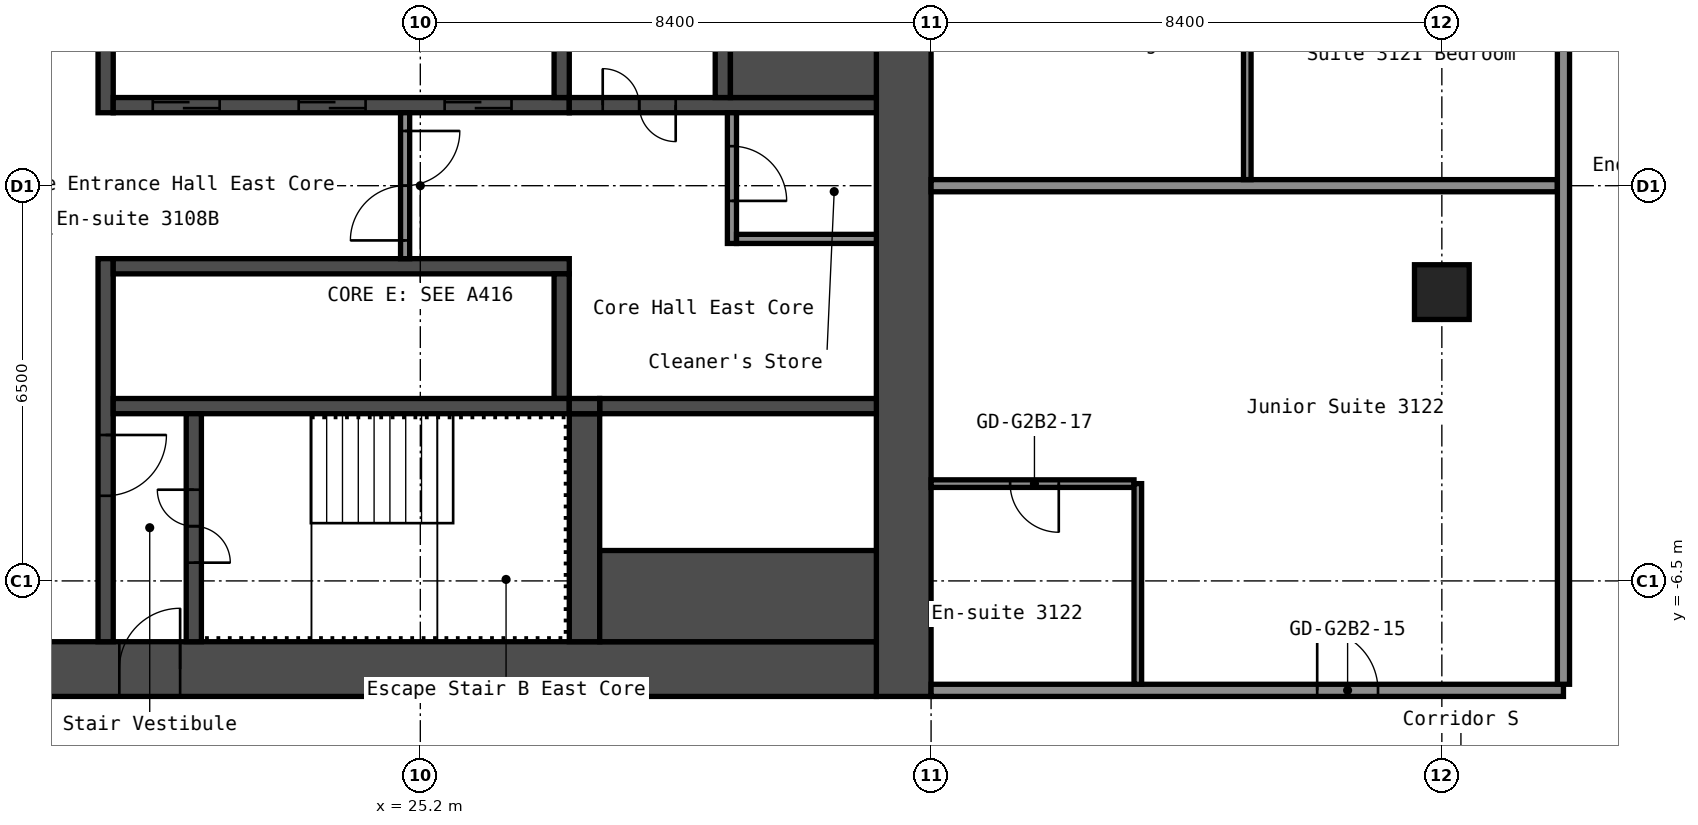
"""IFC4 building model, lengths in metres.
Left out: names, types, materials, properties, quantities, classifications, styles, units other than length and angle.
Written with IfcOpenShell. Run it as: python <this file> out.ifc"""

import sys

from ifc_helpers import new_model, si_unit, direction, frame, frame_2d, origin, origin_2d, place, context, subcontext, project, spatial, rectangle, hollow_rectangle, extrude, element, fill, save


model = new_model("IFC4")
c1 = context("Model", 3, precision=1e-05, world=origin(), true_north=direction((0.0, 1.0)))
c2 = subcontext(c1, "Body", "Model", "MODEL_VIEW")
j1 = project(units=[si_unit("LENGTHUNIT", "METRE"), si_unit("PLANEANGLEUNIT", "RADIAN")], contexts=[c1])
p1 = place(None, origin())
s1 = spatial("IfcSite", under=j1, at=p1, CompositionType="ELEMENT")
p2 = place(p1, origin())
s2 = spatial("IfcBuilding", under=s1, at=p2, CompositionType="ELEMENT")
p3 = place(p2, frame((0.0, 0.0, 110.6)))
s3 = spatial("IfcBuildingStorey", under=s2, at=p3, CompositionType="ELEMENT", Elevation=110.6)
p4 = place(p3, frame((42.0, -1.75, 0.0), z_axis=(0.0, 0.0, 1.0), x_axis=(1.0, 0.0, 0.0)))
e1 = element("IfcColumn", 1, at=p4, inside=s3, PredefinedType="COLUMN", context=c2, shape_type="SweptSolid", body=[
    extrude(hollow_rectangle(XDim=0.9, YDim=0.9, WallThickness=0.036, at=origin_2d()), origin(), (0.0, 0.0, 1.0), 2.8),
])
p5 = place(p3, frame((33.15, -8.4, 0.0), z_axis=(0.0, 0.0, 1.0), x_axis=(0.0, 1.0, 0.0)))
e2 = element("IfcWall", 2, at=p5, inside=s3, PredefinedType="SHEAR", context=c2, shape_type="SweptSolid", body=[
    extrude(rectangle(XDim=16.8, YDim=0.9, at=frame_2d((8.4, 0.0))), origin(), (0.0, 0.0, 1.0), 2.8),
])
p6 = place(p3, frame((17.7, -7.95, 0.0), z_axis=(0.0, 0.0, 1.0), x_axis=(1.0, 0.0, 0.0)))
e3 = element("IfcWall", 3, at=p6, inside=s3, PredefinedType="SHEAR", context=c2, shape_type="SweptSolid", body=[
    extrude(rectangle(XDim=15.0, YDim=0.9, at=frame_2d((7.5, 0.0))), origin(), (0.0, 0.0, 1.0), 2.8),
])
p7 = place(p6, frame((2.55, 0.0, 0.0)))
e4 = element("IfcOpeningElement", 4, at=p7, cuts=e3, PredefinedType="OPENING", context=c2, shape_type="SweptSolid", body=[
    extrude(rectangle(XDim=1.0, YDim=2.1, at=frame_2d((0.5, 1.05))), frame((0.0, 0.46, 0.0), z_axis=(0.0, -1.0, 0.0), x_axis=(1.0, 0.0, 0.0)), (0.0, 0.0, 1.0), 0.92),
])
p8 = place(p3, frame((20.025, 1.2, 0.0), z_axis=(0.0, 0.0, 1.0), x_axis=(0.0, 1.0, 0.0)))
e5 = element("IfcWall", 5, at=p8, inside=s3, PredefinedType="SHEAR", context=c2, shape_type="SweptSolid", body=[
    extrude(rectangle(XDim=6.3, YDim=0.25, at=frame_2d((3.15, 0.0))), origin(), (0.0, 0.0, 1.0), 2.8),
])
p9 = place(p3, frame((20.025, -7.5, 0.0), z_axis=(0.0, 0.0, 1.0), x_axis=(0.0, 1.0, 0.0)))
e6 = element("IfcWall", 6, at=p9, inside=s3, PredefinedType="SHEAR", context=c2, shape_type="SweptSolid", body=[
    extrude(rectangle(XDim=6.3, YDim=0.25, at=frame_2d((3.15, 0.0))), origin(), (0.0, 0.0, 1.0), 2.8),
])
p10 = place(p9, frame((2.4, 0.0, 0.0)))
e7 = element("IfcOpeningElement", 7, at=p10, cuts=e6, PredefinedType="OPENING", context=c2, shape_type="SweptSolid", body=[
    extrude(rectangle(XDim=1.0, YDim=2.1, at=frame_2d((0.5, 1.05))), frame((0.0, 0.135, 0.0), z_axis=(0.0, -1.0, 0.0), x_axis=(1.0, 0.0, 0.0)), (0.0, 0.0, 1.0), 0.27),
])
p11 = place(p3, frame((20.15, 1.325, 0.0), z_axis=(0.0, 0.0, 1.0), x_axis=(1.0, 0.0, 0.0)))
e8 = element("IfcWall", 8, at=p11, inside=s3, PredefinedType="SHEAR", context=c2, shape_type="SweptSolid", body=[
    extrude(rectangle(XDim=7.5, YDim=0.25, at=frame_2d((3.75, 0.0))), origin(), (0.0, 0.0, 1.0), 2.8),
])
p12 = place(p11, frame((0.65, 0.0, 0.0)))
e9 = element("IfcOpeningElement", 9, at=p12, cuts=e8, PredefinedType="OPENING", context=c2, shape_type="SweptSolid", body=[
    extrude(rectangle(XDim=1.1, YDim=2.1, at=frame_2d((0.55, 1.05))), frame((0.0, 0.135, 0.0), z_axis=(0.0, -1.0, 0.0), x_axis=(1.0, 0.0, 0.0)), (0.0, 0.0, 1.0), 0.27),
])
p13 = place(p11, frame((3.05, 0.0, 0.0)))
e10 = element("IfcOpeningElement", 10, at=p13, cuts=e8, PredefinedType="OPENING", context=c2, shape_type="SweptSolid", body=[
    extrude(rectangle(XDim=1.1, YDim=2.1, at=frame_2d((0.55, 1.05))), frame((0.0, 0.135, 0.0), z_axis=(0.0, -1.0, 0.0), x_axis=(1.0, 0.0, 0.0)), (0.0, 0.0, 1.0), 0.27),
])
p14 = place(p11, frame((5.45, 0.0, 0.0)))
e11 = element("IfcOpeningElement", 11, at=p14, cuts=e8, PredefinedType="OPENING", context=c2, shape_type="SweptSolid", body=[
    extrude(rectangle(XDim=1.1, YDim=2.1, at=frame_2d((0.55, 1.05))), frame((0.0, 0.135, 0.0), z_axis=(0.0, -1.0, 0.0), x_axis=(1.0, 0.0, 0.0)), (0.0, 0.0, 1.0), 0.27),
])
p15 = place(p3, frame((27.525, 1.45, 0.0), z_axis=(0.0, 0.0, 1.0), x_axis=(0.0, 1.0, 0.0)))
e12 = element("IfcWall", 12, at=p15, inside=s3, PredefinedType="SHEAR", context=c2, shape_type="SweptSolid", body=[
    extrude(rectangle(XDim=2.05, YDim=0.25, at=frame_2d((1.025, 0.0))), origin(), (0.0, 0.0, 1.0), 2.8),
])
p16 = place(p3, frame((27.65, 1.325, 0.0), z_axis=(0.0, 0.0, 1.0), x_axis=(1.0, 0.0, 0.0)))
e13 = element("IfcWall", 13, at=p16, inside=s3, PredefinedType="SHEAR", context=c2, shape_type="SweptSolid", body=[
    extrude(rectangle(XDim=5.05, YDim=0.25, at=frame_2d((2.525, 0.0))), origin(), (0.0, 0.0, 1.0), 2.8),
])
p17 = place(p16, frame((0.55, 0.0, 0.0)))
e14 = element("IfcOpeningElement", 14, at=p17, cuts=e13, PredefinedType="OPENING", context=c2, shape_type="SweptSolid", body=[
    extrude(rectangle(XDim=1.2, YDim=2.1, at=frame_2d((0.6, 1.05))), frame((0.0, 0.135, 0.0), z_axis=(0.0, -1.0, 0.0), x_axis=(1.0, 0.0, 0.0)), (0.0, 0.0, 1.0), 0.27),
])
p18 = place(p3, frame((30.175, 1.45, 0.0), z_axis=(0.0, 0.0, 1.0), x_axis=(0.0, 1.0, 0.0)))
e15 = element("IfcWall", 15, at=p18, inside=s3, PredefinedType="SHEAR", context=c2, shape_type="SweptSolid", body=[
    extrude(rectangle(XDim=6.05, YDim=0.25, at=frame_2d((3.025, 0.0))), origin(), (0.0, 0.0, 1.0), 2.8),
])
p19 = place(p18, frame((2.625, 0.0, 0.0)))
e16 = element("IfcOpeningElement", 16, at=p19, cuts=e15, PredefinedType="OPENING", context=c2, shape_type="SweptSolid", body=[
    extrude(rectangle(XDim=1.1, YDim=2.1, at=frame_2d((0.55, 1.05))), frame((0.0, 0.135, 0.0), z_axis=(0.0, -1.0, 0.0), x_axis=(1.0, 0.0, 0.0)), (0.0, 0.0, 1.0), 0.27),
])
p20 = place(p3, frame((30.3, 2.375, 0.0), z_axis=(0.0, 0.0, 1.0), x_axis=(1.0, 0.0, 0.0)))
e17 = element("IfcWall", 17, at=p20, inside=s3, PredefinedType="SHEAR", context=c2, shape_type="SweptSolid", body=[
    extrude(rectangle(XDim=2.4, YDim=1.85, at=frame_2d((1.2, 0.0))), origin(), (0.0, 0.0, 1.0), 2.8),
])
p21 = place(p3, frame((20.15, -1.325, 0.0), z_axis=(0.0, 0.0, 1.0), x_axis=(1.0, 0.0, 0.0)))
e18 = element("IfcWall", 18, at=p21, inside=s3, PredefinedType="SHEAR", context=c2, shape_type="SweptSolid", body=[
    extrude(rectangle(XDim=7.5, YDim=0.25, at=frame_2d((3.75, 0.0))), origin(), (0.0, 0.0, 1.0), 2.8),
])
p22 = place(p3, frame((27.525, -3.5, 0.0), z_axis=(0.0, 0.0, 1.0), x_axis=(0.0, 1.0, 0.0)))
e19 = element("IfcWall", 19, at=p22, inside=s3, PredefinedType="SHEAR", context=c2, shape_type="SweptSolid", body=[
    extrude(rectangle(XDim=2.05, YDim=0.25, at=frame_2d((1.025, 0.0))), origin(), (0.0, 0.0, 1.0), 2.8),
])
p23 = place(p3, frame((20.15, -3.625, 0.0), z_axis=(0.0, 0.0, 1.0), x_axis=(1.0, 0.0, 0.0)))
e20 = element("IfcWall", 20, at=p23, inside=s3, PredefinedType="SHEAR", context=c2, shape_type="SweptSolid", body=[
    extrude(rectangle(XDim=7.5, YDim=0.25, at=frame_2d((3.75, 0.0))), origin(), (0.0, 0.0, 1.0), 2.8),
])
p24 = place(p3, frame((21.475, -7.5, 0.0), z_axis=(0.0, 0.0, 1.0), x_axis=(0.0, 1.0, 0.0)))
e21 = element("IfcWall", 21, at=p24, inside=s3, PredefinedType="SHEAR", context=c2, shape_type="SweptSolid", body=[
    extrude(rectangle(XDim=3.75, YDim=0.25, at=frame_2d((1.875, 0.0))), origin(), (0.0, 0.0, 1.0), 2.8),
])
p25 = place(p24, frame((1.3, 0.0, 0.0)))
e22 = element("IfcOpeningElement", 22, at=p25, cuts=e21, PredefinedType="OPENING", context=c2, shape_type="SweptSolid", body=[
    extrude(rectangle(XDim=1.2, YDim=2.1, at=frame_2d((0.6, 1.05))), frame((0.0, 0.135, 0.0), z_axis=(0.0, -1.0, 0.0), x_axis=(1.0, 0.0, 0.0)), (0.0, 0.0, 1.0), 0.27),
])
p26 = place(p3, frame((27.9, -7.5, 0.0), z_axis=(0.0, 0.0, 1.0), x_axis=(0.0, 1.0, 0.0)))
e23 = element("IfcWall", 23, at=p26, inside=s3, PredefinedType="SHEAR", context=c2, shape_type="SweptSolid", body=[
    extrude(rectangle(XDim=3.75, YDim=0.5, at=frame_2d((1.875, 0.0))), origin(), (0.0, 0.0, 1.0), 2.8),
])
p27 = place(p3, frame((28.15, -3.625, 0.0), z_axis=(0.0, 0.0, 1.0), x_axis=(1.0, 0.0, 0.0)))
e24 = element("IfcWall", 24, at=p27, inside=s3, PredefinedType="SHEAR", context=c2, shape_type="SweptSolid", body=[
    extrude(rectangle(XDim=4.55, YDim=0.25, at=frame_2d((2.275, 0.0))), origin(), (0.0, 0.0, 1.0), 2.8),
])
p28 = place(p3, frame((28.15, -6.75, 0.0), z_axis=(0.0, 0.0, 1.0), x_axis=(1.0, 0.0, 0.0)))
e25 = element("IfcWall", 25, at=p28, inside=s3, PredefinedType="SHEAR", context=c2, shape_type="SweptSolid", body=[
    extrude(rectangle(XDim=4.55, YDim=1.5, at=frame_2d((2.275, 0.0))), origin(), (0.0, 0.0, 1.0), 2.8),
])
p29 = place(p3, frame((27.65, -3.625, 0.0), z_axis=(0.0, 0.0, 1.0), x_axis=(1.0, 0.0, 0.0)))
e26 = element("IfcWall", 26, at=p29, inside=s3, PredefinedType="SHEAR", context=c2, shape_type="SweptSolid", body=[
    extrude(rectangle(XDim=0.5, YDim=0.25, at=frame_2d((0.25, 0.0))), origin(), (0.0, 0.0, 1.0), 2.8),
])
p30 = place(p3, frame((24.95, -1.2, 0.0), z_axis=(0.0, 0.0, 1.0), x_axis=(0.0, 1.0, 0.0)))
e27 = element("IfcWall", 27, at=p30, inside=s3, PredefinedType="PARTITIONING", context=c2, shape_type="SweptSolid", body=[
    extrude(rectangle(XDim=2.4, YDim=0.15, at=frame_2d((1.2, 0.0))), origin(), (0.0, 0.0, 1.0), 2.8),
])
p31 = place(p30, frame((0.3, 0.0, 0.0)))
e28 = element("IfcOpeningElement", 28, at=p31, cuts=e27, PredefinedType="OPENING", context=c2, shape_type="SweptSolid", body=[
    extrude(rectangle(XDim=1.8, YDim=2.1, at=frame_2d((0.9, 1.05))), frame((0.0, 0.085, 0.0), z_axis=(0.0, -1.0, 0.0), x_axis=(1.0, 0.0, 0.0)), (0.0, 0.0, 1.0), 0.17),
])
p32 = place(p3, frame((30.325, -0.95, 0.0), z_axis=(0.0, 0.0, 1.0), x_axis=(0.0, 1.0, 0.0)))
e29 = element("IfcWall", 29, at=p32, inside=s3, PredefinedType="PARTITIONING", context=c2, shape_type="SweptSolid", body=[
    extrude(rectangle(XDim=2.15, YDim=0.15, at=frame_2d((1.075, 0.0))), origin(), (0.0, 0.0, 1.0), 2.8),
])
p33 = place(p32, frame((0.7, 0.0, 0.0)))
e30 = element("IfcOpeningElement", 30, at=p33, cuts=e29, PredefinedType="OPENING", context=c2, shape_type="SweptSolid", body=[
    extrude(rectangle(XDim=0.9, YDim=2.1, at=frame_2d((0.45, 1.05))), frame((0.0, 0.085, 0.0), z_axis=(0.0, -1.0, 0.0), x_axis=(1.0, 0.0, 0.0)), (0.0, 0.0, 1.0), 0.17),
])
p34 = place(p3, frame((30.4, -0.875, 0.0), z_axis=(0.0, 0.0, 1.0), x_axis=(1.0, 0.0, 0.0)))
e31 = element("IfcWall", 31, at=p34, inside=s3, PredefinedType="PARTITIONING", context=c2, shape_type="SweptSolid", body=[
    extrude(rectangle(XDim=2.3, YDim=0.15, at=frame_2d((1.15, 0.0))), origin(), (0.0, 0.0, 1.0), 2.8),
])
p35 = place(p3, frame((33.6, -8.3, 0.0), z_axis=(0.0, 0.0, 1.0), x_axis=(1.0, 0.0, 0.0)))
e32 = element("IfcWall", 32, at=p35, inside=s3, PredefinedType="PARTITIONING", context=c2, shape_type="SweptSolid", body=[
    extrude(rectangle(XDim=10.4, YDim=0.2, at=frame_2d((5.2, 0.0))), origin(), (0.0, 0.0, 1.0), 2.8),
])
p36 = place(p35, frame((6.35, 0.0, 0.0)))
e33 = element("IfcOpeningElement", 33, at=p36, cuts=e32, PredefinedType="OPENING", context=c2, shape_type="SweptSolid", body=[
    extrude(rectangle(XDim=1.0, YDim=2.1, at=frame_2d((0.5, 1.05))), frame((0.0, 0.11, 0.0), z_axis=(0.0, -1.0, 0.0), x_axis=(1.0, 0.0, 0.0)), (0.0, 0.0, 1.0), 0.22),
])
p37 = place(p3, frame((33.6, -4.9, 0.0), z_axis=(0.0, 0.0, 1.0), x_axis=(1.0, 0.0, 0.0)))
e34 = element("IfcWall", 34, at=p37, inside=s3, PredefinedType="PARTITIONING", context=c2, shape_type="SweptSolid", body=[
    extrude(rectangle(XDim=3.337, YDim=0.125, at=frame_2d((1.669, 0.0))), origin(), (0.0, 0.0, 1.0), 2.8),
])
p38 = place(p37, frame((1.3, 0.0, 0.0)))
e35 = element("IfcOpeningElement", 35, at=p38, cuts=e34, PredefinedType="OPENING", context=c2, shape_type="SweptSolid", body=[
    extrude(rectangle(XDim=0.8, YDim=2.1, at=frame_2d((0.4, 1.05))), frame((0.0, 0.073, 0.0), z_axis=(0.0, -1.0, 0.0), x_axis=(1.0, 0.0, 0.0)), (0.0, 0.0, 1.0), 0.145),
])
p39 = place(p3, frame((33.6, 0.0, 0.0), z_axis=(0.0, 0.0, 1.0), x_axis=(1.0, 0.0, 0.0)))
e36 = element("IfcWall", 36, at=p39, inside=s3, PredefinedType="PARTITIONING", context=c2, shape_type="SweptSolid", body=[
    extrude(rectangle(XDim=10.3, YDim=0.2, at=frame_2d((5.15, 0.0))), origin(), (0.0, 0.0, 1.0), 2.8),
])
p40 = place(p3, frame((37.0, -8.2, 0.0), z_axis=(0.0, 0.0, 1.0), x_axis=(0.0, 1.0, 0.0)))
e37 = element("IfcWall", 37, at=p40, inside=s3, PredefinedType="PARTITIONING", context=c2, shape_type="SweptSolid", body=[
    extrude(rectangle(XDim=3.3, YDim=0.125, at=frame_2d((1.65, 0.0))), origin(), (0.0, 0.0, 1.0), 2.8),
])
p41 = place(p3, frame((38.8, 0.1, 0.0), z_axis=(0.0, 0.0, 1.0), x_axis=(0.0, 1.0, 0.0)))
e38 = element("IfcWall", 38, at=p41, inside=s3, PredefinedType="PARTITIONING", context=c2, shape_type="SweptSolid", body=[
    extrude(rectangle(XDim=8.1, YDim=0.125, at=frame_2d((4.05, 0.0))), origin(), (0.0, 0.0, 1.0), 2.8),
])
p42 = place(p41, frame((3.15, 0.0, 0.0)))
e39 = element("IfcOpeningElement", 39, at=p42, cuts=e38, PredefinedType="OPENING", context=c2, shape_type="SweptSolid", body=[
    extrude(rectangle(XDim=0.9, YDim=2.1, at=frame_2d((0.45, 1.05))), frame((0.0, 0.073, 0.0), z_axis=(0.0, -1.0, 0.0), x_axis=(1.0, 0.0, 0.0)), (0.0, 0.0, 1.0), 0.145),
])
p43 = place(p3, frame((44.0, -8.2, 0.0), z_axis=(0.0, 0.0, 1.0), x_axis=(0.0, 1.0, 0.0)))
e40 = element("IfcWall", 40, at=p43, inside=s3, PredefinedType="PARTITIONING", context=c2, shape_type="SweptSolid", body=[
    extrude(rectangle(XDim=16.4, YDim=0.2, at=frame_2d((8.2, 0.0))), origin(), (0.0, 0.0, 1.0), 2.8),
])
p44 = place(p7, origin())
e41 = element("IfcDoor", 41, at=p44, inside=s3, OperationType="SINGLE_SWING_LEFT", PredefinedType="DOOR", context=c2, shape_type="SweptSolid", body=[
    extrude(rectangle(XDim=1.0, YDim=2.1, at=frame_2d((0.5, 1.05))), frame((0.0, 0.025, 0.0), z_axis=(0.0, -1.0, 0.0), x_axis=(1.0, 0.0, 0.0)), (0.0, 0.0, 1.0), 0.05),
])
fill(e4, e41)
p45 = place(p25, origin())
e42 = element("IfcDoor", 42, at=p45, inside=s3, OperationType="DOUBLE_DOOR_SINGLE_SWING", PredefinedType="DOOR", context=c2, shape_type="SweptSolid", body=[
    extrude(rectangle(XDim=1.2, YDim=2.1, at=frame_2d((0.6, 1.05))), frame((0.0, 0.025, 0.0), z_axis=(0.0, -1.0, 0.0), x_axis=(1.0, 0.0, 0.0)), (0.0, 0.0, 1.0), 0.05),
])
fill(e22, e42)
p46 = place(p10, origin())
e43 = element("IfcDoor", 43, at=p46, inside=s3, OperationType="SINGLE_SWING_RIGHT", PredefinedType="DOOR", context=c2, shape_type="SweptSolid", body=[
    extrude(rectangle(XDim=1.0, YDim=2.1, at=frame_2d((0.5, 1.05))), frame((0.0, 0.025, 0.0), z_axis=(0.0, -1.0, 0.0), x_axis=(1.0, 0.0, 0.0)), (0.0, 0.0, 1.0), 0.05),
])
fill(e7, e43)
p47 = place(p17, origin())
e44 = element("IfcDoor", 44, at=p47, inside=s3, OperationType="DOUBLE_DOOR_SINGLE_SWING", PredefinedType="DOOR", context=c2, shape_type="SweptSolid", body=[
    extrude(rectangle(XDim=1.2, YDim=2.1, at=frame_2d((0.6, 1.05))), frame((0.0, 0.025, 0.0), z_axis=(0.0, -1.0, 0.0), x_axis=(1.0, 0.0, 0.0)), (0.0, 0.0, 1.0), 0.05),
])
fill(e14, e44)
p48 = place(p31, origin())
e45 = element("IfcDoor", 45, at=p48, inside=s3, OperationType="DOUBLE_DOOR_SINGLE_SWING", PredefinedType="DOOR", context=c2, shape_type="SweptSolid", body=[
    extrude(rectangle(XDim=1.8, YDim=2.1, at=frame_2d((0.9, 1.05))), frame((0.0, 0.025, 0.0), z_axis=(0.0, -1.0, 0.0), x_axis=(1.0, 0.0, 0.0)), (0.0, 0.0, 1.0), 0.05),
])
fill(e28, e45)
p49 = place(p33, origin())
e46 = element("IfcDoor", 46, at=p49, inside=s3, OperationType="SINGLE_SWING_LEFT", PredefinedType="DOOR", context=c2, shape_type="SweptSolid", body=[
    extrude(rectangle(XDim=0.9, YDim=2.1, at=frame_2d((0.45, 1.05))), frame((0.0, 0.025, 0.0), z_axis=(0.0, -1.0, 0.0), x_axis=(1.0, 0.0, 0.0)), (0.0, 0.0, 1.0), 0.05),
])
fill(e30, e46)
p50 = place(p12, origin())
e47 = element("IfcDoor", 47, at=p50, inside=s3, OperationType="DOUBLE_DOOR_SLIDING", PredefinedType="DOOR", context=c2, shape_type="SweptSolid", body=[
    extrude(rectangle(XDim=1.1, YDim=2.1, at=frame_2d((0.55, 1.05))), frame((0.0, 0.025, 0.0), z_axis=(0.0, -1.0, 0.0), x_axis=(1.0, 0.0, 0.0)), (0.0, 0.0, 1.0), 0.05),
])
fill(e9, e47)
p51 = place(p13, origin())
e48 = element("IfcDoor", 48, at=p51, inside=s3, OperationType="DOUBLE_DOOR_SLIDING", PredefinedType="DOOR", context=c2, shape_type="SweptSolid", body=[
    extrude(rectangle(XDim=1.1, YDim=2.1, at=frame_2d((0.55, 1.05))), frame((0.0, 0.025, 0.0), z_axis=(0.0, -1.0, 0.0), x_axis=(1.0, 0.0, 0.0)), (0.0, 0.0, 1.0), 0.05),
])
fill(e10, e48)
p52 = place(p14, origin())
e49 = element("IfcDoor", 49, at=p52, inside=s3, OperationType="DOUBLE_DOOR_SLIDING", PredefinedType="DOOR", context=c2, shape_type="SweptSolid", body=[
    extrude(rectangle(XDim=1.1, YDim=2.1, at=frame_2d((0.55, 1.05))), frame((0.0, 0.025, 0.0), z_axis=(0.0, -1.0, 0.0), x_axis=(1.0, 0.0, 0.0)), (0.0, 0.0, 1.0), 0.05),
])
fill(e11, e49)
p53 = place(p36, origin())
e50 = element("IfcDoor", 50, at=p53, inside=s3, OperationType="SINGLE_SWING_RIGHT", PredefinedType="DOOR", context=c2, shape_type="SweptSolid", body=[
    extrude(rectangle(XDim=1.0, YDim=2.1, at=frame_2d((0.5, 1.05))), frame((0.0, 0.025, 0.0), z_axis=(0.0, -1.0, 0.0), x_axis=(1.0, 0.0, 0.0)), (0.0, 0.0, 1.0), 0.05),
])
fill(e33, e50)
p54 = place(p38, origin())
e51 = element("IfcDoor", 51, at=p54, inside=s3, OperationType="SINGLE_SWING_RIGHT", PredefinedType="DOOR", context=c2, shape_type="SweptSolid", body=[
    extrude(rectangle(XDim=0.8, YDim=2.1, at=frame_2d((0.4, 1.05))), frame((0.0, 0.025, 0.0), z_axis=(0.0, -1.0, 0.0), x_axis=(1.0, 0.0, 0.0)), (0.0, 0.0, 1.0), 0.05),
])
fill(e35, e51)
save(model, sys.argv[1])
